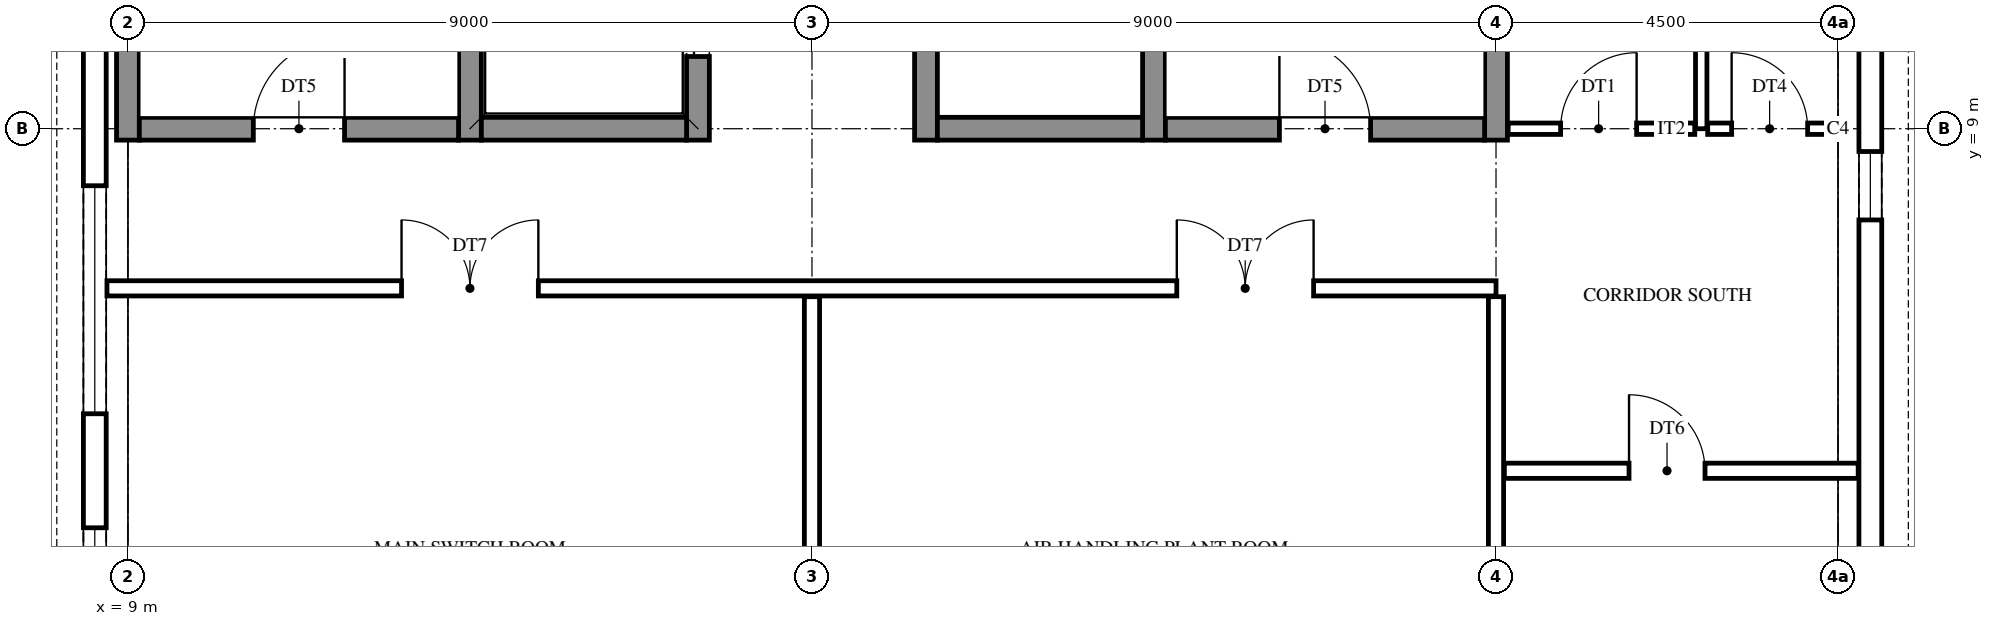
"""IFC4 building model, lengths in metres.
Left out: names, types, materials, properties, quantities, classifications, styles, units other than length and angle.
Written with IfcOpenShell. Run it as: python <this file> out.ifc"""

import sys

from ifc_helpers import new_model, si_unit, direction, frame, frame_2d, origin, origin_2d, place, context, subcontext, project, spatial, rectangle, i_section, extrude, element, fill, save


model = new_model("IFC4")
c1 = context("Model", 3, precision=1e-05, world=origin(), true_north=direction((0.0, 1.0)))
c2 = subcontext(c1, "Body", "Model", "MODEL_VIEW")
j1 = project(units=[si_unit("LENGTHUNIT", "METRE"), si_unit("PLANEANGLEUNIT", "RADIAN")], contexts=[c1])
p1 = place(None, origin())
s1 = spatial("IfcSite", under=j1, at=p1, CompositionType="ELEMENT")
p2 = place(p1, origin())
s2 = spatial("IfcBuilding", under=s1, at=p2, CompositionType="ELEMENT")
p3 = place(p2, frame((0.0, 0.0, 69.9)))
s3 = spatial("IfcBuildingStorey", under=s2, at=p3, CompositionType="ELEMENT", Elevation=69.9)
p4 = place(p3, frame((31.5, 9.0, 0.0), z_axis=(0.0, 0.0, 1.0), x_axis=(1.0, 0.0, 0.0)))
e1 = element("IfcColumn", 1, at=p4, inside=s3, PredefinedType="COLUMN", context=c2, shape_type="SweptSolid", body=[
    extrude(i_section(OverallWidth=0.256, OverallDepth=0.26, WebThickness=0.01, FlangeThickness=0.017, FilletRadius=0.014, at=origin_2d()), origin(), (0.0, 0.0, 1.0), 4.5),
])
for number, where, z_axis, x_axis in (
    (2, (9.0, 8.85, 0.0), (0.0, 0.0, 1.0), (0.0, 1.0, 0.0)),
    (3, (13.5, 8.85, 0.0), (0.0, 0.0, 1.0), (0.0, 1.0, 0.0)),
):
    element("IfcWall", number, at=place(p3, frame(where, z_axis=z_axis, x_axis=x_axis)), inside=s3, PredefinedType="SHEAR", context=c2, shape_type="SweptSolid", body=[
        extrude(rectangle(XDim=9.3, YDim=0.3, at=frame_2d((4.65, 0.0))), origin(), (0.0, 0.0, 1.0), 4.5),
    ])
p5 = place(p3, frame((16.5, 8.85, 0.0), z_axis=(0.0, 0.0, 1.0), x_axis=(0.0, 1.0, 0.0)))
e4 = element("IfcWall", 4, at=p5, inside=s3, PredefinedType="SHEAR", context=c2, shape_type="SweptSolid", body=[
    extrude(rectangle(XDim=9.3, YDim=0.3, at=frame_2d((4.65, 0.0))), origin(), (0.0, 0.0, 1.0), 4.5),
])
p6 = place(p5, frame((1.1, 0.0, 0.0)))
e5 = element("IfcOpeningElement", 5, at=p6, cuts=e4, PredefinedType="OPENING", context=c2, shape_type="SweptSolid", body=[
    extrude(rectangle(XDim=1.1, YDim=2.1, at=frame_2d((0.55, 1.05))), frame((0.0, 0.16, 0.0), z_axis=(0.0, -1.0, 0.0), x_axis=(1.0, 0.0, 0.0)), (0.0, 0.0, 1.0), 0.32),
])
p7 = place(p5, frame((4.1, 0.0, 0.0)))
e6 = element("IfcOpeningElement", 6, at=p7, cuts=e4, PredefinedType="OPENING", context=c2, shape_type="SweptSolid", body=[
    extrude(rectangle(XDim=1.1, YDim=2.1, at=frame_2d((0.55, 1.05))), frame((0.0, 0.16, 0.0), z_axis=(0.0, -1.0, 0.0), x_axis=(1.0, 0.0, 0.0)), (0.0, 0.0, 1.0), 0.32),
])
p8 = place(p3, frame((19.5, 8.85, 0.0), z_axis=(0.0, 0.0, 1.0), x_axis=(0.0, 1.0, 0.0)))
e7 = element("IfcWall", 7, at=p8, inside=s3, PredefinedType="SHEAR", context=c2, shape_type="SweptSolid", body=[
    extrude(rectangle(XDim=9.3, YDim=0.3, at=frame_2d((4.65, 0.0))), origin(), (0.0, 0.0, 1.0), 4.5),
])
p9 = place(p8, frame((3.95, 0.0, 0.0)))
e8 = element("IfcOpeningElement", 8, at=p9, cuts=e7, PredefinedType="OPENING", context=c2, shape_type="SweptSolid", body=[
    extrude(rectangle(XDim=1.4, YDim=2.1, at=frame_2d((0.7, 1.05))), frame((0.0, 0.16, 0.0), z_axis=(0.0, -1.0, 0.0), x_axis=(1.0, 0.0, 0.0)), (0.0, 0.0, 1.0), 0.32),
])
p10 = place(p8, frame((7.1, 0.0, 0.0)))
e9 = element("IfcOpeningElement", 9, at=p10, cuts=e7, PredefinedType="OPENING", context=c2, shape_type="SweptSolid", body=[
    extrude(rectangle(XDim=1.1, YDim=2.1, at=frame_2d((0.55, 1.05))), frame((0.0, 0.16, 0.0), z_axis=(0.0, -1.0, 0.0), x_axis=(1.0, 0.0, 0.0)), (0.0, 0.0, 1.0), 0.32),
])
for number, where, z_axis, x_axis in (
    (10, (22.5, 8.85, 0.0), (0.0, 0.0, 1.0), (0.0, 1.0, 0.0)),
    (11, (27.0, 8.85, 0.0), (0.0, 0.0, 1.0), (0.0, 1.0, 0.0)),
):
    element("IfcWall", number, at=place(p3, frame(where, z_axis=z_axis, x_axis=x_axis)), inside=s3, PredefinedType="SHEAR", context=c2, shape_type="SweptSolid", body=[
        extrude(rectangle(XDim=9.3, YDim=0.3, at=frame_2d((4.65, 0.0))), origin(), (0.0, 0.0, 1.0), 4.5),
    ])
p11 = place(p3, frame((9.15, 9.0, 0.0), z_axis=(0.0, 0.0, 1.0), x_axis=(1.0, 0.0, 0.0)))
e12 = element("IfcWall", 12, at=p11, inside=s3, PredefinedType="SHEAR", context=c2, shape_type="SweptSolid", body=[
    extrude(rectangle(XDim=4.2, YDim=0.3, at=frame_2d((2.1, 0.0))), origin(), (0.0, 0.0, 1.0), 4.5),
])
p12 = place(p11, frame((1.5, 0.0, 0.0)))
e13 = element("IfcOpeningElement", 13, at=p12, cuts=e12, PredefinedType="OPENING", context=c2, shape_type="SweptSolid", body=[
    extrude(rectangle(XDim=1.2, YDim=2.1, at=frame_2d((0.6, 1.05))), frame((0.0, 0.16, 0.0), z_axis=(0.0, -1.0, 0.0), x_axis=(1.0, 0.0, 0.0)), (0.0, 0.0, 1.0), 0.32),
])
for number, where, z_axis, x_axis in (
    (14, (13.65, 9.0, 0.0), (0.0, 0.0, 1.0), (1.0, 0.0, 0.0)),
    (15, (19.65, 9.0, 0.0), (0.0, 0.0, 1.0), (1.0, 0.0, 0.0)),
):
    element("IfcWall", number, at=place(p3, frame(where, z_axis=z_axis, x_axis=x_axis)), inside=s3, PredefinedType="SHEAR", context=c2, shape_type="SweptSolid", body=[
        extrude(rectangle(XDim=2.7, YDim=0.3, at=frame_2d((1.35, 0.0))), origin(), (0.0, 0.0, 1.0), 4.5),
    ])
p13 = place(p3, frame((22.65, 9.0, 0.0), z_axis=(0.0, 0.0, 1.0), x_axis=(1.0, 0.0, 0.0)))
e16 = element("IfcWall", 16, at=p13, inside=s3, PredefinedType="SHEAR", context=c2, shape_type="SweptSolid", body=[
    extrude(rectangle(XDim=4.2, YDim=0.3, at=frame_2d((2.1, 0.0))), origin(), (0.0, 0.0, 1.0), 4.5),
])
p14 = place(p13, frame((1.5, 0.0, 0.0)))
e17 = element("IfcOpeningElement", 17, at=p14, cuts=e16, PredefinedType="OPENING", context=c2, shape_type="SweptSolid", body=[
    extrude(rectangle(XDim=1.2, YDim=2.1, at=frame_2d((0.6, 1.05))), frame((0.0, 0.16, 0.0), z_axis=(0.0, -1.0, 0.0), x_axis=(1.0, 0.0, 0.0)), (0.0, 0.0, 1.0), 0.32),
])
p15 = place(p3, frame((8.564, -0.286, 0.0), z_axis=(0.0, 0.0, 1.0), x_axis=(0.0, 1.0, 0.0)))
e18 = element("IfcWall", 18, at=p15, inside=s3, PredefinedType="STANDARD", context=c2, shape_type="SweptSolid", body=[
    extrude(rectangle(XDim=27.572, YDim=0.3, at=frame_2d((13.786, 0.0))), origin(), (0.0, 0.0, 1.0), 4.5),
])
p16 = place(p15, frame((1.036, 0.0, 0.6)))
e19 = element("IfcOpeningElement", 19, at=p16, cuts=e18, PredefinedType="OPENING", context=c2, shape_type="SweptSolid", body=[
    extrude(rectangle(XDim=3.0, YDim=3.1, at=frame_2d((1.5, 1.55))), frame((0.0, 0.16, 0.0), z_axis=(0.0, -1.0, 0.0), x_axis=(1.0, 0.0, 0.0)), (0.0, 0.0, 1.0), 0.32),
])
p17 = place(p15, frame((5.536, 0.0, 0.6)))
e20 = element("IfcOpeningElement", 20, at=p17, cuts=e18, PredefinedType="OPENING", context=c2, shape_type="SweptSolid", body=[
    extrude(rectangle(XDim=3.0, YDim=3.1, at=frame_2d((1.5, 1.55))), frame((0.0, 0.16, 0.0), z_axis=(0.0, -1.0, 0.0), x_axis=(1.0, 0.0, 0.0)), (0.0, 0.0, 1.0), 0.32),
])
p18 = place(p15, frame((19.036, 0.0, 0.6)))
e21 = element("IfcOpeningElement", 21, at=p18, cuts=e18, PredefinedType="OPENING", context=c2, shape_type="SweptSolid", body=[
    extrude(rectangle(XDim=3.0, YDim=3.1, at=frame_2d((1.5, 1.55))), frame((0.0, 0.16, 0.0), z_axis=(0.0, -1.0, 0.0), x_axis=(1.0, 0.0, 0.0)), (0.0, 0.0, 1.0), 0.32),
])
p19 = place(p15, frame((23.536, 0.0, 0.6)))
e22 = element("IfcOpeningElement", 22, at=p19, cuts=e18, PredefinedType="OPENING", context=c2, shape_type="SweptSolid", body=[
    extrude(rectangle(XDim=3.0, YDim=3.1, at=frame_2d((1.5, 1.55))), frame((0.0, 0.16, 0.0), z_axis=(0.0, -1.0, 0.0), x_axis=(1.0, 0.0, 0.0)), (0.0, 0.0, 1.0), 0.32),
])
p20 = place(p3, frame((31.925, 18.275, 0.0), z_axis=(0.0, 0.0, 1.0), x_axis=(0.0, -1.0, 0.0)))
e23 = element("IfcWall", 23, at=p20, inside=s3, PredefinedType="STANDARD", context=c2, shape_type="SweptSolid", body=[
    extrude(rectangle(XDim=18.55, YDim=0.3, at=frame_2d((9.275, 0.0))), origin(), (0.0, 0.0, 1.0), 4.5),
])
p21 = place(p20, frame((17.075, 0.0, 0.6)))
e24 = element("IfcOpeningElement", 24, at=p21, cuts=e23, PredefinedType="OPENING", context=c2, shape_type="SweptSolid", body=[
    extrude(rectangle(XDim=0.9, YDim=2.3, at=frame_2d((0.45, 1.15))), frame((0.0, 0.16, 0.0), z_axis=(0.0, -1.0, 0.0), x_axis=(1.0, 0.0, 0.0)), (0.0, 0.0, 1.0), 0.32),
])
p22 = place(p20, frame((9.575, 0.0, 0.6)))
e25 = element("IfcOpeningElement", 25, at=p22, cuts=e23, PredefinedType="OPENING", context=c2, shape_type="SweptSolid", body=[
    extrude(rectangle(XDim=0.9, YDim=2.3, at=frame_2d((0.45, 1.15))), frame((0.0, 0.16, 0.0), z_axis=(0.0, -1.0, 0.0), x_axis=(1.0, 0.0, 0.0)), (0.0, 0.0, 1.0), 0.32),
])
p23 = place(p20, frame((6.725, 0.0, 1.6)))
e26 = element("IfcOpeningElement", 26, at=p23, cuts=e23, PredefinedType="OPENING", context=c2, shape_type="SweptSolid", body=[
    extrude(rectangle(XDim=0.6, YDim=0.9, at=frame_2d((0.3, 0.45))), frame((0.0, 0.16, 0.0), z_axis=(0.0, -1.0, 0.0), x_axis=(1.0, 0.0, 0.0)), (0.0, 0.0, 1.0), 0.32),
])
p24 = place(p20, frame((2.225, 0.0, 1.6)))
e27 = element("IfcOpeningElement", 27, at=p24, cuts=e23, PredefinedType="OPENING", context=c2, shape_type="SweptSolid", body=[
    extrude(rectangle(XDim=0.6, YDim=0.9, at=frame_2d((0.3, 0.45))), frame((0.0, 0.16, 0.0), z_axis=(0.0, -1.0, 0.0), x_axis=(1.0, 0.0, 0.0)), (0.0, 0.0, 1.0), 0.32),
])
p25 = place(p3, frame((8.564, -0.286, 4.5), z_axis=(0.0, 0.0, 1.0), x_axis=(0.0, 1.0, 0.0)))
e28 = element("IfcWall", 28, at=p25, inside=s3, PredefinedType="PARAPET", context=c2, shape_type="SweptSolid", body=[
    extrude(rectangle(XDim=27.572, YDim=0.3, at=frame_2d((13.786, 0.0))), origin(), (0.0, 0.0, 1.0), 1.25),
])
p26 = place(p3, frame((31.925, 18.275, 4.5), z_axis=(0.0, 0.0, 1.0), x_axis=(0.0, -1.0, 0.0)))
e29 = element("IfcWall", 29, at=p26, inside=s3, PredefinedType="PARAPET", context=c2, shape_type="SweptSolid", body=[
    extrude(rectangle(XDim=18.55, YDim=0.3, at=frame_2d((9.275, 0.0))), origin(), (0.0, 0.0, 1.0), 1.25),
])
for number, where, z_axis, x_axis in (
    (30, (18.0, 0.14, 0.0), (0.0, 0.0, 1.0), (0.0, 1.0, 0.0)),
    (31, (27.0, 0.14, 0.0), (0.0, 0.0, 1.0), (0.0, 1.0, 0.0)),
):
    element("IfcWall", number, at=place(p3, frame(where, z_axis=z_axis, x_axis=x_axis)), inside=s3, PredefinedType="PARTITIONING", context=c2, shape_type="SweptSolid", body=[
        extrude(rectangle(XDim=6.65, YDim=0.2, at=frame_2d((3.325, 0.0))), origin(), (0.0, 0.0, 1.0), 3.822),
    ])
p27 = place(p3, frame((29.7, 9.0, 0.0), z_axis=(0.0, 0.0, 1.0), x_axis=(0.0, 1.0, 0.0)))
e32 = element("IfcWall", 32, at=p27, inside=s3, PredefinedType="PARTITIONING", context=c2, shape_type="SweptSolid", body=[
    extrude(rectangle(XDim=6.3, YDim=0.15, at=frame_2d((3.15, 0.0))), origin(), (0.0, 0.0, 1.0), 3.822),
])
p28 = place(p27, frame((4.0, 0.0, 0.0)))
e33 = element("IfcOpeningElement", 33, at=p28, cuts=e32, PredefinedType="OPENING", context=c2, shape_type="SweptSolid", body=[
    extrude(rectangle(XDim=1.0, YDim=2.1, at=frame_2d((0.5, 1.05))), frame((0.0, 0.085, 0.0), z_axis=(0.0, -1.0, 0.0), x_axis=(1.0, 0.0, 0.0)), (0.0, 0.0, 1.0), 0.17),
])
p29 = place(p3, frame((27.11, 4.5, 0.0), z_axis=(0.0, 0.0, 1.0), x_axis=(1.0, 0.0, 0.0)))
e34 = element("IfcWall", 34, at=p29, inside=s3, PredefinedType="PARTITIONING", context=c2, shape_type="SweptSolid", body=[
    extrude(rectangle(XDim=4.655, YDim=0.2, at=frame_2d((2.327, 0.0))), origin(), (0.0, 0.0, 1.0), 3.822),
])
p30 = place(p29, frame((1.64, 0.0, 0.0)))
e35 = element("IfcOpeningElement", 35, at=p30, cuts=e34, PredefinedType="OPENING", context=c2, shape_type="SweptSolid", body=[
    extrude(rectangle(XDim=1.0, YDim=2.1, at=frame_2d((0.5, 1.05))), frame((0.0, 0.11, 0.0), z_axis=(0.0, -1.0, 0.0), x_axis=(1.0, 0.0, 0.0)), (0.0, 0.0, 1.0), 0.22),
])
p31 = place(p3, frame((8.724, 6.9, 0.0), z_axis=(0.0, 0.0, 1.0), x_axis=(1.0, 0.0, 0.0)))
e36 = element("IfcWall", 36, at=p31, inside=s3, PredefinedType="PARTITIONING", context=c2, shape_type="SweptSolid", body=[
    extrude(rectangle(XDim=18.276, YDim=0.2, at=frame_2d((9.138, 0.0))), origin(), (0.0, 0.0, 1.0), 3.822),
])
p32 = place(p31, frame((3.876, 0.0, 0.0)))
e37 = element("IfcOpeningElement", 37, at=p32, cuts=e36, PredefinedType="OPENING", context=c2, shape_type="SweptSolid", body=[
    extrude(rectangle(XDim=1.8, YDim=2.1, at=frame_2d((0.9, 1.05))), frame((0.0, 0.11, 0.0), z_axis=(0.0, -1.0, 0.0), x_axis=(1.0, 0.0, 0.0)), (0.0, 0.0, 1.0), 0.22),
])
p33 = place(p31, frame((14.076, 0.0, 0.0)))
e38 = element("IfcOpeningElement", 38, at=p33, cuts=e36, PredefinedType="OPENING", context=c2, shape_type="SweptSolid", body=[
    extrude(rectangle(XDim=1.8, YDim=2.1, at=frame_2d((0.9, 1.05))), frame((0.0, 0.11, 0.0), z_axis=(0.0, -1.0, 0.0), x_axis=(1.0, 0.0, 0.0)), (0.0, 0.0, 1.0), 0.22),
])
p34 = place(p3, frame((27.16, 9.0, 0.0), z_axis=(0.0, 0.0, 1.0), x_axis=(1.0, 0.0, 0.0)))
e39 = element("IfcWall", 39, at=p34, inside=s3, PredefinedType="PARTITIONING", context=c2, shape_type="SweptSolid", body=[
    extrude(rectangle(XDim=2.455, YDim=0.15, at=frame_2d((1.228, 0.0))), origin(), (0.0, 0.0, 1.0), 3.822),
])
p35 = place(p34, frame((0.69, 0.0, 0.0)))
e40 = element("IfcOpeningElement", 40, at=p35, cuts=e39, PredefinedType="OPENING", context=c2, shape_type="SweptSolid", body=[
    extrude(rectangle(XDim=1.0, YDim=2.1, at=frame_2d((0.5, 1.05))), frame((0.0, 0.085, 0.0), z_axis=(0.0, -1.0, 0.0), x_axis=(1.0, 0.0, 0.0)), (0.0, 0.0, 1.0), 0.17),
])
p36 = place(p3, frame((29.785, 9.0, 0.0), z_axis=(0.0, 0.0, 1.0), x_axis=(1.0, 0.0, 0.0)))
e41 = element("IfcWall", 41, at=p36, inside=s3, PredefinedType="PARTITIONING", context=c2, shape_type="SweptSolid", body=[
    extrude(rectangle(XDim=1.577, YDim=0.15, at=frame_2d((0.789, 0.0))), origin(), (0.0, 0.0, 1.0), 3.822),
])
p37 = place(p36, frame((0.315, 0.0, 0.0)))
e42 = element("IfcOpeningElement", 42, at=p37, cuts=e41, PredefinedType="OPENING", context=c2, shape_type="SweptSolid", body=[
    extrude(rectangle(XDim=1.0, YDim=2.1, at=frame_2d((0.5, 1.05))), frame((0.0, 0.085, 0.0), z_axis=(0.0, -1.0, 0.0), x_axis=(1.0, 0.0, 0.0)), (0.0, 0.0, 1.0), 0.17),
])
for number, where, z_axis, x_axis in (
    (43, (13.5, 8.85, 4.5), (0.0, 0.0, 1.0), (0.0, 1.0, 0.0)),
    (44, (16.5, 8.85, 4.5), (0.0, 0.0, 1.0), (0.0, 1.0, 0.0)),
):
    element("IfcWall", number, at=place(p3, frame(where, z_axis=z_axis, x_axis=x_axis)), inside=s3, PredefinedType="SOLIDWALL", context=c2, shape_type="SweptSolid", body=[
        extrude(rectangle(XDim=9.3, YDim=0.3, at=frame_2d((4.65, 0.0))), origin(), (0.0, 0.0, 1.0), 4.5),
    ])
p38 = place(p3, frame((13.65, 9.0, 4.5), z_axis=(0.0, 0.0, 1.0), x_axis=(1.0, 0.0, 0.0)))
e45 = element("IfcWall", 45, at=p38, inside=s3, PredefinedType="SOLIDWALL", context=c2, shape_type="SweptSolid", body=[
    extrude(rectangle(XDim=2.7, YDim=0.3, at=frame_2d((1.35, 0.0))), origin(), (0.0, 0.0, 1.0), 4.5),
])
for number, where, z_axis, x_axis in (
    (46, (19.5, 8.85, 4.5), (0.0, 0.0, 1.0), (0.0, 1.0, 0.0)),
    (47, (22.5, 8.85, 4.5), (0.0, 0.0, 1.0), (0.0, 1.0, 0.0)),
):
    element("IfcWall", number, at=place(p3, frame(where, z_axis=z_axis, x_axis=x_axis)), inside=s3, PredefinedType="SOLIDWALL", context=c2, shape_type="SweptSolid", body=[
        extrude(rectangle(XDim=9.3, YDim=0.3, at=frame_2d((4.65, 0.0))), origin(), (0.0, 0.0, 1.0), 4.5),
    ])
p39 = place(p3, frame((19.65, 9.0, 4.5), z_axis=(0.0, 0.0, 1.0), x_axis=(1.0, 0.0, 0.0)))
e48 = element("IfcWall", 48, at=p39, inside=s3, PredefinedType="SOLIDWALL", context=c2, shape_type="SweptSolid", body=[
    extrude(rectangle(XDim=2.7, YDim=0.3, at=frame_2d((1.35, 0.0))), origin(), (0.0, 0.0, 1.0), 4.5),
])
p40 = place(p16, origin())
e49 = element("IfcWindow", 49, at=p40, inside=s3, PartitioningType="SINGLE_PANEL", PredefinedType="WINDOW", context=c2, shape_type="SweptSolid", body=[
    extrude(rectangle(XDim=3.0, YDim=3.1, at=frame_2d((1.5, 1.55))), frame((0.0, 0.03, 0.0), z_axis=(0.0, -1.0, 0.0), x_axis=(1.0, 0.0, 0.0)), (0.0, 0.0, 1.0), 0.06),
])
fill(e19, e49)
p41 = place(p17, origin())
e50 = element("IfcWindow", 50, at=p41, inside=s3, PartitioningType="SINGLE_PANEL", PredefinedType="WINDOW", context=c2, shape_type="SweptSolid", body=[
    extrude(rectangle(XDim=3.0, YDim=3.1, at=frame_2d((1.5, 1.55))), frame((0.0, 0.03, 0.0), z_axis=(0.0, -1.0, 0.0), x_axis=(1.0, 0.0, 0.0)), (0.0, 0.0, 1.0), 0.06),
])
fill(e20, e50)
p42 = place(p22, origin())
e51 = element("IfcWindow", 51, at=p42, inside=s3, PartitioningType="SINGLE_PANEL", PredefinedType="WINDOW", context=c2, shape_type="SweptSolid", body=[
    extrude(rectangle(XDim=0.9, YDim=2.3, at=frame_2d((0.45, 1.15))), frame((0.0, 0.03, 0.0), z_axis=(0.0, -1.0, 0.0), x_axis=(1.0, 0.0, 0.0)), (0.0, 0.0, 1.0), 0.06),
])
fill(e25, e51)
p43 = place(p12, origin())
e52 = element("IfcDoor", 52, at=p43, inside=s3, OperationType="SINGLE_SWING_RIGHT", PredefinedType="DOOR", context=c2, shape_type="SweptSolid", body=[
    extrude(rectangle(XDim=1.2, YDim=2.1, at=frame_2d((0.6, 1.05))), frame((0.0, 0.025, 0.0), z_axis=(0.0, -1.0, 0.0), x_axis=(1.0, 0.0, 0.0)), (0.0, 0.0, 1.0), 0.05),
])
fill(e13, e52)
p44 = place(p14, origin())
e53 = element("IfcDoor", 53, at=p44, inside=s3, OperationType="SINGLE_SWING_LEFT", PredefinedType="DOOR", context=c2, shape_type="SweptSolid", body=[
    extrude(rectangle(XDim=1.2, YDim=2.1, at=frame_2d((0.6, 1.05))), frame((0.0, 0.025, 0.0), z_axis=(0.0, -1.0, 0.0), x_axis=(1.0, 0.0, 0.0)), (0.0, 0.0, 1.0), 0.05),
])
fill(e17, e53)
p45 = place(p35, origin())
e54 = element("IfcDoor", 54, at=p45, inside=s3, OperationType="SINGLE_SWING_RIGHT", PredefinedType="DOOR", context=c2, shape_type="SweptSolid", body=[
    extrude(rectangle(XDim=1.0, YDim=2.1, at=frame_2d((0.5, 1.05))), frame((0.0, 0.025, 0.0), z_axis=(0.0, -1.0, 0.0), x_axis=(1.0, 0.0, 0.0)), (0.0, 0.0, 1.0), 0.05),
])
fill(e40, e54)
p46 = place(p37, origin())
e55 = element("IfcDoor", 55, at=p46, inside=s3, OperationType="SINGLE_SWING_LEFT", PredefinedType="DOOR", context=c2, shape_type="SweptSolid", body=[
    extrude(rectangle(XDim=1.0, YDim=2.1, at=frame_2d((0.5, 1.05))), frame((0.0, 0.025, 0.0), z_axis=(0.0, -1.0, 0.0), x_axis=(1.0, 0.0, 0.0)), (0.0, 0.0, 1.0), 0.05),
])
fill(e42, e55)
p47 = place(p30, frame((1.0, 0.0, 0.0), z_axis=(0.0, 0.0, 1.0), x_axis=(-1.0, 0.0, 0.0)))
e56 = element("IfcDoor", 56, at=p47, inside=s3, OperationType="SINGLE_SWING_LEFT", PredefinedType="DOOR", context=c2, shape_type="SweptSolid", body=[
    extrude(rectangle(XDim=1.0, YDim=2.1, at=frame_2d((0.5, 1.05))), frame((0.0, 0.025, 0.0), z_axis=(0.0, -1.0, 0.0), x_axis=(1.0, 0.0, 0.0)), (0.0, 0.0, 1.0), 0.05),
])
fill(e35, e56)
p48 = place(p32, frame((1.8, 0.0, 0.0), z_axis=(0.0, 0.0, 1.0), x_axis=(-1.0, 0.0, 0.0)))
e57 = element("IfcDoor", 57, at=p48, inside=s3, OperationType="DOUBLE_DOOR_SINGLE_SWING", PredefinedType="DOOR", context=c2, shape_type="SweptSolid", body=[
    extrude(rectangle(XDim=1.8, YDim=2.1, at=frame_2d((0.9, 1.05))), frame((0.0, 0.025, 0.0), z_axis=(0.0, -1.0, 0.0), x_axis=(1.0, 0.0, 0.0)), (0.0, 0.0, 1.0), 0.05),
])
fill(e37, e57)
p49 = place(p33, frame((1.8, 0.0, 0.0), z_axis=(0.0, 0.0, 1.0), x_axis=(-1.0, 0.0, 0.0)))
e58 = element("IfcDoor", 58, at=p49, inside=s3, OperationType="DOUBLE_DOOR_SINGLE_SWING", PredefinedType="DOOR", context=c2, shape_type="SweptSolid", body=[
    extrude(rectangle(XDim=1.8, YDim=2.1, at=frame_2d((0.9, 1.05))), frame((0.0, 0.025, 0.0), z_axis=(0.0, -1.0, 0.0), x_axis=(1.0, 0.0, 0.0)), (0.0, 0.0, 1.0), 0.05),
])
fill(e38, e58)
p50 = place(p6, origin())
e59 = element("IfcDoor", 59, at=p50, inside=s3, OperationType="DOUBLE_DOOR_SLIDING", PredefinedType="DOOR", context=c2, shape_type="SweptSolid", body=[
    extrude(rectangle(XDim=1.1, YDim=2.1, at=frame_2d((0.55, 1.05))), frame((0.0, 0.025, 0.0), z_axis=(0.0, -1.0, 0.0), x_axis=(1.0, 0.0, 0.0)), (0.0, 0.0, 1.0), 0.05),
])
fill(e5, e59)
save(model, sys.argv[1])
